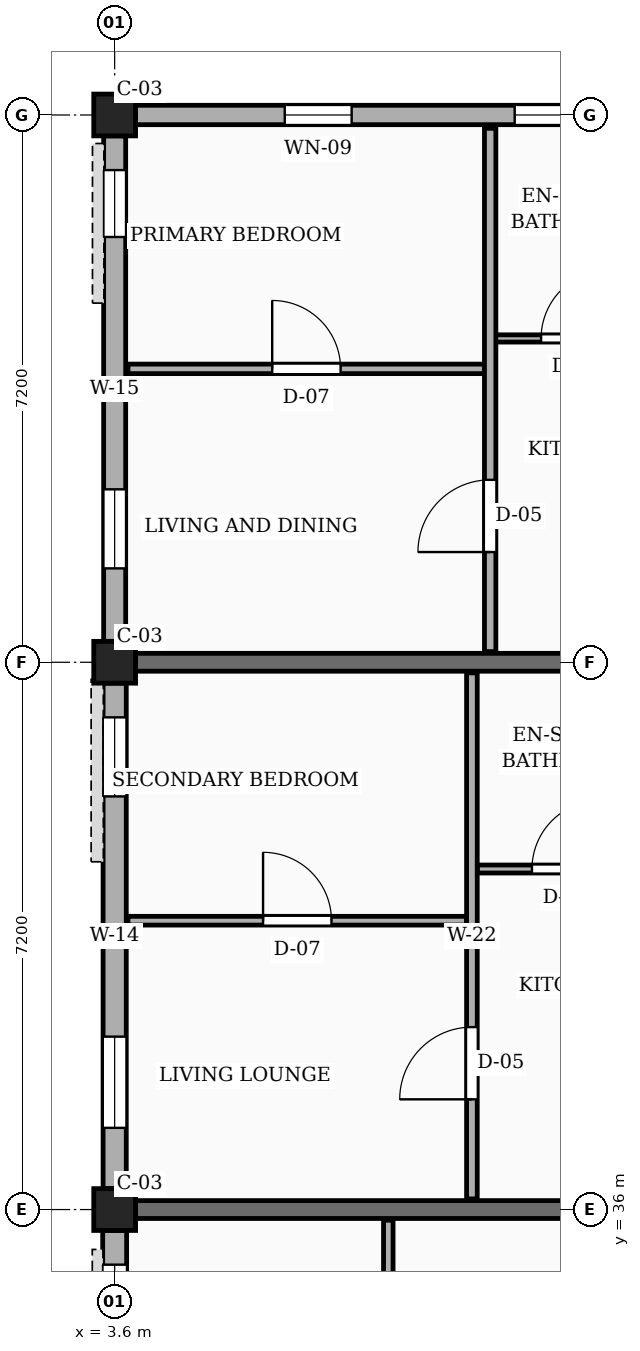
"""IFC4 building model, lengths in metres.
Left out: names, types, materials, properties, quantities, classifications, styles, units other than length and angle.
Written with IfcOpenShell. Run it as: python <this file> out.ifc"""

import sys

from ifc_helpers import new_model, si_unit, direction, frame, frame_2d, origin, origin_2d, place, context, subcontext, project, spatial, rectangle, extrude, element, fill, save


model = new_model("IFC4")
c1 = context("Model", 3, precision=1e-05, world=origin(), true_north=direction((0.0, 1.0)))
c2 = subcontext(c1, "Body", "Model", "MODEL_VIEW")
j1 = project(units=[si_unit("LENGTHUNIT", "METRE"), si_unit("PLANEANGLEUNIT", "RADIAN")], contexts=[c1])
p1 = place(None, origin())
s1 = spatial("IfcSite", under=j1, at=p1, CompositionType="ELEMENT")
p2 = place(p1, origin())
s2 = spatial("IfcBuilding", under=s1, at=p2, CompositionType="ELEMENT")
p3 = place(p2, frame((0.0, 0.0, 17.1)))
s3 = spatial("IfcBuildingStorey", under=s2, at=p3, CompositionType="ELEMENT", Elevation=17.1)
for number, where, z_axis, x_axis in (
    (1, (3.6, 36.0, 0.0), (0.0, 0.0, 1.0), (1.0, 0.0, 0.0)),
    (2, (3.6, 43.2, 0.0), (0.0, 0.0, 1.0), (1.0, 0.0, 0.0)),
    (3, (3.6, 50.4, 0.0), (0.0, 0.0, 1.0), (1.0, 0.0, 0.0)),
):
    element("IfcColumn", number, at=place(p3, frame(where, z_axis=z_axis, x_axis=x_axis)), inside=s3, PredefinedType="COLUMN", context=c2, shape_type="SweptSolid", body=[
        extrude(rectangle(XDim=0.55, YDim=0.55, at=origin_2d()), origin(), (0.0, 0.0, 1.0), 3.15),
    ])
for number, where, z_axis, x_axis in (
    (4, (3.875, 36.0, 0.0), (0.0, 0.0, 1.0), (1.0, 0.0, 0.0)),
    (5, (3.875, 43.2, 0.0), (0.0, 0.0, 1.0), (1.0, 0.0, 0.0)),
):
    element("IfcWall", number, at=place(p3, frame(where, z_axis=z_axis, x_axis=x_axis)), inside=s3, PredefinedType="SOLIDWALL", context=c2, shape_type="SweptSolid", body=[
        extrude(rectangle(XDim=6.7, YDim=0.235, at=frame_2d((3.35, 0.0))), origin(), (0.0, 0.0, 1.0), 2.17),
    ])
p4 = place(p3, frame((10.525, 50.4, 0.0), z_axis=(0.0, 0.0, 1.0), x_axis=(-1.0, 0.0, 0.0)))
e6 = element("IfcWall", 6, at=p4, inside=s3, PredefinedType="SOLIDWALL", context=c2, shape_type="SweptSolid", body=[
    extrude(rectangle(XDim=6.65, YDim=0.255, at=frame_2d((3.325, 0.0))), origin(), (0.0, 0.0, 1.0), 2.44),
])
p5 = place(p4, frame((0.462, 0.0, 0.78)))
e7 = element("IfcOpeningElement", 7, at=p5, cuts=e6, PredefinedType="OPENING", context=c2, shape_type="SweptSolid", body=[
    extrude(rectangle(XDim=1.2, YDim=1.26, at=frame_2d((0.6, 0.63))), frame((0.0, 0.137, 0.0), z_axis=(0.0, -1.0, 0.0), x_axis=(1.0, 0.0, 0.0)), (0.0, 0.0, 1.0), 0.275),
])
p6 = place(p4, frame((3.808, 0.0, 0.78)))
e8 = element("IfcOpeningElement", 8, at=p6, cuts=e6, PredefinedType="OPENING", context=c2, shape_type="SweptSolid", body=[
    extrude(rectangle(XDim=0.88, YDim=1.26, at=frame_2d((0.44, 0.63))), frame((0.0, 0.137, 0.0), z_axis=(0.0, -1.0, 0.0), x_axis=(1.0, 0.0, 0.0)), (0.0, 0.0, 1.0), 0.275),
])
p7 = place(p3, frame((3.6, 50.125, 0.0), z_axis=(0.0, 0.0, 1.0), x_axis=(0.0, -1.0, 0.0)))
e9 = element("IfcWall", 9, at=p7, inside=s3, PredefinedType="SOLIDWALL", context=c2, shape_type="SweptSolid", body=[
    extrude(rectangle(XDim=6.65, YDim=0.29, at=frame_2d((3.325, 0.0))), origin(), (0.0, 0.0, 1.0), 2.44),
])
p8 = place(p7, frame((0.45, 0.0, 0.78)))
e10 = element("IfcOpeningElement", 10, at=p8, cuts=e9, PredefinedType="OPENING", context=c2, shape_type="SweptSolid", body=[
    extrude(rectangle(XDim=0.88, YDim=1.26, at=frame_2d((0.44, 0.63))), frame((0.0, 0.155, 0.0), z_axis=(0.0, -1.0, 0.0), x_axis=(1.0, 0.0, 0.0)), (0.0, 0.0, 1.0), 0.31),
])
p9 = place(p7, frame((4.65, 0.0, 0.78)))
e11 = element("IfcOpeningElement", 11, at=p9, cuts=e9, PredefinedType="OPENING", context=c2, shape_type="SweptSolid", body=[
    extrude(rectangle(XDim=1.04, YDim=1.26, at=frame_2d((0.52, 0.63))), frame((0.0, 0.155, 0.0), z_axis=(0.0, -1.0, 0.0), x_axis=(1.0, 0.0, 0.0)), (0.0, 0.0, 1.0), 0.31),
])
p10 = place(p3, frame((3.6, 42.925, 0.0), z_axis=(0.0, 0.0, 1.0), x_axis=(0.0, -1.0, 0.0)))
e12 = element("IfcWall", 12, at=p10, inside=s3, PredefinedType="SOLIDWALL", context=c2, shape_type="SweptSolid", body=[
    extrude(rectangle(XDim=6.65, YDim=0.305, at=frame_2d((3.325, 0.0))), origin(), (0.0, 0.0, 1.0), 2.44),
])
p11 = place(p10, frame((0.45, 0.0, 0.78)))
e13 = element("IfcOpeningElement", 13, at=p11, cuts=e12, PredefinedType="OPENING", context=c2, shape_type="SweptSolid", body=[
    extrude(rectangle(XDim=1.04, YDim=1.26, at=frame_2d((0.52, 0.63))), frame((0.0, 0.163, 0.0), z_axis=(0.0, -1.0, 0.0), x_axis=(1.0, 0.0, 0.0)), (0.0, 0.0, 1.0), 0.325),
])
p12 = place(p10, frame((4.65, 0.0, 0.78)))
e14 = element("IfcOpeningElement", 14, at=p12, cuts=e12, PredefinedType="OPENING", context=c2, shape_type="SweptSolid", body=[
    extrude(rectangle(XDim=1.2, YDim=1.26, at=frame_2d((0.6, 0.63))), frame((0.0, 0.163, 0.0), z_axis=(0.0, -1.0, 0.0), x_axis=(1.0, 0.0, 0.0)), (0.0, 0.0, 1.0), 0.325),
])
p13 = place(p3, frame((3.6, 35.725, 0.0), z_axis=(0.0, 0.0, 1.0), x_axis=(0.0, -1.0, 0.0)))
e15 = element("IfcWall", 15, at=p13, inside=s3, PredefinedType="SOLIDWALL", context=c2, shape_type="SweptSolid", body=[
    extrude(rectangle(XDim=6.65, YDim=0.315, at=frame_2d((3.325, 0.0))), origin(), (0.0, 0.0, 1.0), 2.44),
])
p14 = place(p13, frame((0.45, 0.0, 0.78)))
e16 = element("IfcOpeningElement", 16, at=p14, cuts=e15, PredefinedType="OPENING", context=c2, shape_type="SweptSolid", body=[
    extrude(rectangle(XDim=1.2, YDim=1.26, at=frame_2d((0.6, 0.63))), frame((0.0, 0.167, 0.0), z_axis=(0.0, -1.0, 0.0), x_axis=(1.0, 0.0, 0.0)), (0.0, 0.0, 1.0), 0.335),
])
p15 = place(p13, frame((4.65, 0.0, 0.78)))
e17 = element("IfcOpeningElement", 17, at=p15, cuts=e15, PredefinedType="OPENING", context=c2, shape_type="SweptSolid", body=[
    extrude(rectangle(XDim=1.36, YDim=1.26, at=frame_2d((0.68, 0.63))), frame((0.0, 0.167, 0.0), z_axis=(0.0, -1.0, 0.0), x_axis=(1.0, 0.0, 0.0)), (0.0, 0.0, 1.0), 0.335),
])
p16 = place(p3, frame((7.2, 28.94, 0.0), z_axis=(0.0, 0.0, 1.0), x_axis=(0.0, 1.0, 0.0)))
e18 = element("IfcWall", 18, at=p16, inside=s3, PredefinedType="PARTITIONING", context=c2, shape_type="SweptSolid", body=[
    extrude(rectangle(XDim=6.92, YDim=0.125, at=frame_2d((3.46, 0.0))), origin(), (0.0, 0.0, 1.0), 2.305),
])
p17 = place(p16, frame((1.05, 0.0, 0.0)))
e19 = element("IfcOpeningElement", 19, at=p17, cuts=e18, PredefinedType="OPENING", context=c2, shape_type="SweptSolid", body=[
    extrude(rectangle(XDim=0.87, YDim=2.05, at=frame_2d((0.435, 1.025))), frame((0.0, 0.073, 0.0), z_axis=(0.0, -1.0, 0.0), x_axis=(1.0, 0.0, 0.0)), (0.0, 0.0, 1.0), 0.145),
])
p18 = place(p16, frame((4.45, 0.0, 0.0)))
e20 = element("IfcOpeningElement", 20, at=p18, cuts=e18, PredefinedType="OPENING", context=c2, shape_type="SweptSolid", body=[
    extrude(rectangle(XDim=0.88, YDim=2.08, at=frame_2d((0.44, 1.04))), frame((0.0, 0.073, 0.0), z_axis=(0.0, -1.0, 0.0), x_axis=(1.0, 0.0, 0.0)), (0.0, 0.0, 1.0), 0.145),
])
p19 = place(p3, frame((3.775, 39.8, 0.0), z_axis=(0.0, 0.0, 1.0), x_axis=(1.0, 0.0, 0.0)))
e21 = element("IfcWall", 21, at=p19, inside=s3, PredefinedType="PARTITIONING", context=c2, shape_type="SweptSolid", body=[
    extrude(rectangle(XDim=4.455, YDim=0.115, at=frame_2d((2.228, 0.0))), origin(), (0.0, 0.0, 1.0), 2.305),
])
p20 = place(p19, frame((1.778, 0.0, 0.0)))
e22 = element("IfcOpeningElement", 22, at=p20, cuts=e21, PredefinedType="OPENING", context=c2, shape_type="SweptSolid", body=[
    extrude(rectangle(XDim=0.9, YDim=2.1, at=frame_2d((0.45, 1.05))), frame((0.0, 0.067, 0.0), z_axis=(0.0, -1.0, 0.0), x_axis=(1.0, 0.0, 0.0)), (0.0, 0.0, 1.0), 0.135),
])
p21 = place(p3, frame((8.37, 40.48, 0.0), z_axis=(0.0, 0.0, 1.0), x_axis=(1.0, 0.0, 0.0)))
e23 = element("IfcWall", 23, at=p21, inside=s3, PredefinedType="PARTITIONING", context=c2, shape_type="SweptSolid", body=[
    extrude(rectangle(XDim=2.34, YDim=0.105, at=frame_2d((1.17, 0.0))), origin(), (0.0, 0.0, 1.0), 2.305),
])
p22 = place(p21, frame((0.72, 0.0, 0.0)))
e24 = element("IfcOpeningElement", 24, at=p22, cuts=e23, PredefinedType="OPENING", context=c2, shape_type="SweptSolid", body=[
    extrude(rectangle(XDim=0.9, YDim=2.05, at=frame_2d((0.45, 1.025))), frame((0.0, 0.062, 0.0), z_axis=(0.0, -1.0, 0.0), x_axis=(1.0, 0.0, 0.0)), (0.0, 0.0, 1.0), 0.125),
])
p23 = place(p3, frame((8.3, 36.14, 0.0), z_axis=(0.0, 0.0, 1.0), x_axis=(0.0, 1.0, 0.0)))
e25 = element("IfcWall", 25, at=p23, inside=s3, PredefinedType="PARTITIONING", context=c2, shape_type="SweptSolid", body=[
    extrude(rectangle(XDim=6.92, YDim=0.14, at=frame_2d((3.46, 0.0))), origin(), (0.0, 0.0, 1.0), 2.305),
])
p24 = place(p23, frame((1.31, 0.0, 0.0)))
e26 = element("IfcOpeningElement", 26, at=p24, cuts=e25, PredefinedType="OPENING", context=c2, shape_type="SweptSolid", body=[
    extrude(rectangle(XDim=0.95, YDim=2.1, at=frame_2d((0.475, 1.05))), frame((0.0, 0.08, 0.0), z_axis=(0.0, -1.0, 0.0), x_axis=(1.0, 0.0, 0.0)), (0.0, 0.0, 1.0), 0.16),
])
p25 = place(p3, frame((3.775, 47.06, 0.0), z_axis=(0.0, 0.0, 1.0), x_axis=(1.0, 0.0, 0.0)))
e27 = element("IfcWall", 27, at=p25, inside=s3, PredefinedType="PARTITIONING", context=c2, shape_type="SweptSolid", body=[
    extrude(rectangle(XDim=4.695, YDim=0.125, at=frame_2d((2.348, 0.0))), origin(), (0.0, 0.0, 1.0), 2.305),
])
p26 = place(p25, frame((1.897, 0.0, 0.0)))
e28 = element("IfcOpeningElement", 28, at=p26, cuts=e27, PredefinedType="OPENING", context=c2, shape_type="SweptSolid", body=[
    extrude(rectangle(XDim=0.9, YDim=2.1, at=frame_2d((0.45, 1.05))), frame((0.0, 0.073, 0.0), z_axis=(0.0, -1.0, 0.0), x_axis=(1.0, 0.0, 0.0)), (0.0, 0.0, 1.0), 0.145),
])
p27 = place(p3, frame((8.61, 47.46, 0.0), z_axis=(0.0, 0.0, 1.0), x_axis=(1.0, 0.0, 0.0)))
e29 = element("IfcWall", 29, at=p27, inside=s3, PredefinedType="PARTITIONING", context=c2, shape_type="SweptSolid", body=[
    extrude(rectangle(XDim=2.1, YDim=0.095, at=frame_2d((1.05, 0.0))), origin(), (0.0, 0.0, 1.0), 2.305),
])
p28 = place(p27, frame((0.6, 0.0, 0.0)))
e30 = element("IfcOpeningElement", 30, at=p28, cuts=e29, PredefinedType="OPENING", context=c2, shape_type="SweptSolid", body=[
    extrude(rectangle(XDim=0.9, YDim=2.05, at=frame_2d((0.45, 1.025))), frame((0.0, 0.058, 0.0), z_axis=(0.0, -1.0, 0.0), x_axis=(1.0, 0.0, 0.0)), (0.0, 0.0, 1.0), 0.115),
])
p29 = place(p3, frame((8.54, 43.34, 0.0), z_axis=(0.0, 0.0, 1.0), x_axis=(0.0, 1.0, 0.0)))
e31 = element("IfcWall", 31, at=p29, inside=s3, PredefinedType="PARTITIONING", context=c2, shape_type="SweptSolid", body=[
    extrude(rectangle(XDim=6.885, YDim=0.15, at=frame_2d((3.442, 0.0))), origin(), (0.0, 0.0, 1.0), 2.305),
])
p30 = place(p29, frame((1.31, 0.0, 0.0)))
e32 = element("IfcOpeningElement", 32, at=p30, cuts=e31, PredefinedType="OPENING", context=c2, shape_type="SweptSolid", body=[
    extrude(rectangle(XDim=0.95, YDim=2.1, at=frame_2d((0.475, 1.05))), frame((0.0, 0.085, 0.0), z_axis=(0.0, -1.0, 0.0), x_axis=(1.0, 0.0, 0.0)), (0.0, 0.0, 1.0), 0.17),
])
p31 = place(p5, origin())
e33 = element("IfcWindow", 33, at=p31, inside=s3, PartitioningType="SINGLE_PANEL", PredefinedType="WINDOW", context=c2, shape_type="SweptSolid", body=[
    extrude(rectangle(XDim=1.2, YDim=1.26, at=frame_2d((0.6, 0.63))), frame((0.0, 0.03, 0.0), z_axis=(0.0, -1.0, 0.0), x_axis=(1.0, 0.0, 0.0)), (0.0, 0.0, 1.0), 0.06),
])
fill(e7, e33)
p32 = place(p6, origin())
e34 = element("IfcWindow", 34, at=p32, inside=s3, PartitioningType="SINGLE_PANEL", PredefinedType="WINDOW", context=c2, shape_type="SweptSolid", body=[
    extrude(rectangle(XDim=0.88, YDim=1.26, at=frame_2d((0.44, 0.63))), frame((0.0, 0.03, 0.0), z_axis=(0.0, -1.0, 0.0), x_axis=(1.0, 0.0, 0.0)), (0.0, 0.0, 1.0), 0.06),
])
fill(e8, e34)
p33 = place(p8, origin())
e35 = element("IfcWindow", 35, at=p33, inside=s3, PartitioningType="SINGLE_PANEL", PredefinedType="WINDOW", context=c2, shape_type="SweptSolid", body=[
    extrude(rectangle(XDim=0.88, YDim=1.26, at=frame_2d((0.44, 0.63))), frame((0.0, 0.03, 0.0), z_axis=(0.0, -1.0, 0.0), x_axis=(1.0, 0.0, 0.0)), (0.0, 0.0, 1.0), 0.06),
])
fill(e10, e35)
p34 = place(p9, origin())
e36 = element("IfcWindow", 36, at=p34, inside=s3, PartitioningType="SINGLE_PANEL", PredefinedType="WINDOW", context=c2, shape_type="SweptSolid", body=[
    extrude(rectangle(XDim=1.04, YDim=1.26, at=frame_2d((0.52, 0.63))), frame((0.0, 0.03, 0.0), z_axis=(0.0, -1.0, 0.0), x_axis=(1.0, 0.0, 0.0)), (0.0, 0.0, 1.0), 0.06),
])
fill(e11, e36)
p35 = place(p11, origin())
e37 = element("IfcWindow", 37, at=p35, inside=s3, PartitioningType="SINGLE_PANEL", PredefinedType="WINDOW", context=c2, shape_type="SweptSolid", body=[
    extrude(rectangle(XDim=1.04, YDim=1.26, at=frame_2d((0.52, 0.63))), frame((0.0, 0.03, 0.0), z_axis=(0.0, -1.0, 0.0), x_axis=(1.0, 0.0, 0.0)), (0.0, 0.0, 1.0), 0.06),
])
fill(e13, e37)
p36 = place(p12, origin())
e38 = element("IfcWindow", 38, at=p36, inside=s3, PartitioningType="SINGLE_PANEL", PredefinedType="WINDOW", context=c2, shape_type="SweptSolid", body=[
    extrude(rectangle(XDim=1.2, YDim=1.26, at=frame_2d((0.6, 0.63))), frame((0.0, 0.03, 0.0), z_axis=(0.0, -1.0, 0.0), x_axis=(1.0, 0.0, 0.0)), (0.0, 0.0, 1.0), 0.06),
])
fill(e14, e38)
p37 = place(p14, origin())
e39 = element("IfcWindow", 39, at=p37, inside=s3, PartitioningType="SINGLE_PANEL", PredefinedType="WINDOW", context=c2, shape_type="SweptSolid", body=[
    extrude(rectangle(XDim=1.2, YDim=1.26, at=frame_2d((0.6, 0.63))), frame((0.0, 0.03, 0.0), z_axis=(0.0, -1.0, 0.0), x_axis=(1.0, 0.0, 0.0)), (0.0, 0.0, 1.0), 0.06),
])
fill(e16, e39)
p38 = place(p20, origin())
e40 = element("IfcDoor", 40, at=p38, inside=s3, OperationType="SINGLE_SWING_LEFT", PredefinedType="DOOR", context=c2, shape_type="SweptSolid", body=[
    extrude(rectangle(XDim=0.9, YDim=2.1, at=frame_2d((0.45, 1.05))), frame((0.0, 0.025, 0.0), z_axis=(0.0, -1.0, 0.0), x_axis=(1.0, 0.0, 0.0)), (0.0, 0.0, 1.0), 0.05),
])
fill(e22, e40)
p39 = place(p22, origin())
e41 = element("IfcDoor", 41, at=p39, inside=s3, OperationType="SINGLE_SWING_RIGHT", PredefinedType="DOOR", context=c2, shape_type="SweptSolid", body=[
    extrude(rectangle(XDim=0.9, YDim=2.05, at=frame_2d((0.45, 1.025))), frame((0.0, 0.025, 0.0), z_axis=(0.0, -1.0, 0.0), x_axis=(1.0, 0.0, 0.0)), (0.0, 0.0, 1.0), 0.05),
])
fill(e24, e41)
p40 = place(p24, origin())
e42 = element("IfcDoor", 42, at=p40, inside=s3, OperationType="SINGLE_SWING_LEFT", PredefinedType="DOOR", context=c2, shape_type="SweptSolid", body=[
    extrude(rectangle(XDim=0.95, YDim=2.1, at=frame_2d((0.475, 1.05))), frame((0.0, 0.025, 0.0), z_axis=(0.0, -1.0, 0.0), x_axis=(1.0, 0.0, 0.0)), (0.0, 0.0, 1.0), 0.05),
])
fill(e26, e42)
p41 = place(p26, origin())
e43 = element("IfcDoor", 43, at=p41, inside=s3, OperationType="SINGLE_SWING_LEFT", PredefinedType="DOOR", context=c2, shape_type="SweptSolid", body=[
    extrude(rectangle(XDim=0.9, YDim=2.1, at=frame_2d((0.45, 1.05))), frame((0.0, 0.025, 0.0), z_axis=(0.0, -1.0, 0.0), x_axis=(1.0, 0.0, 0.0)), (0.0, 0.0, 1.0), 0.05),
])
fill(e28, e43)
p42 = place(p28, origin())
e44 = element("IfcDoor", 44, at=p42, inside=s3, OperationType="SINGLE_SWING_RIGHT", PredefinedType="DOOR", context=c2, shape_type="SweptSolid", body=[
    extrude(rectangle(XDim=0.9, YDim=2.05, at=frame_2d((0.45, 1.025))), frame((0.0, 0.025, 0.0), z_axis=(0.0, -1.0, 0.0), x_axis=(1.0, 0.0, 0.0)), (0.0, 0.0, 1.0), 0.05),
])
fill(e30, e44)
p43 = place(p30, origin())
e45 = element("IfcDoor", 45, at=p43, inside=s3, OperationType="SINGLE_SWING_LEFT", PredefinedType="DOOR", context=c2, shape_type="SweptSolid", body=[
    extrude(rectangle(XDim=0.95, YDim=2.1, at=frame_2d((0.475, 1.05))), frame((0.0, 0.025, 0.0), z_axis=(0.0, -1.0, 0.0), x_axis=(1.0, 0.0, 0.0)), (0.0, 0.0, 1.0), 0.05),
])
fill(e32, e45)
save(model, sys.argv[1])
